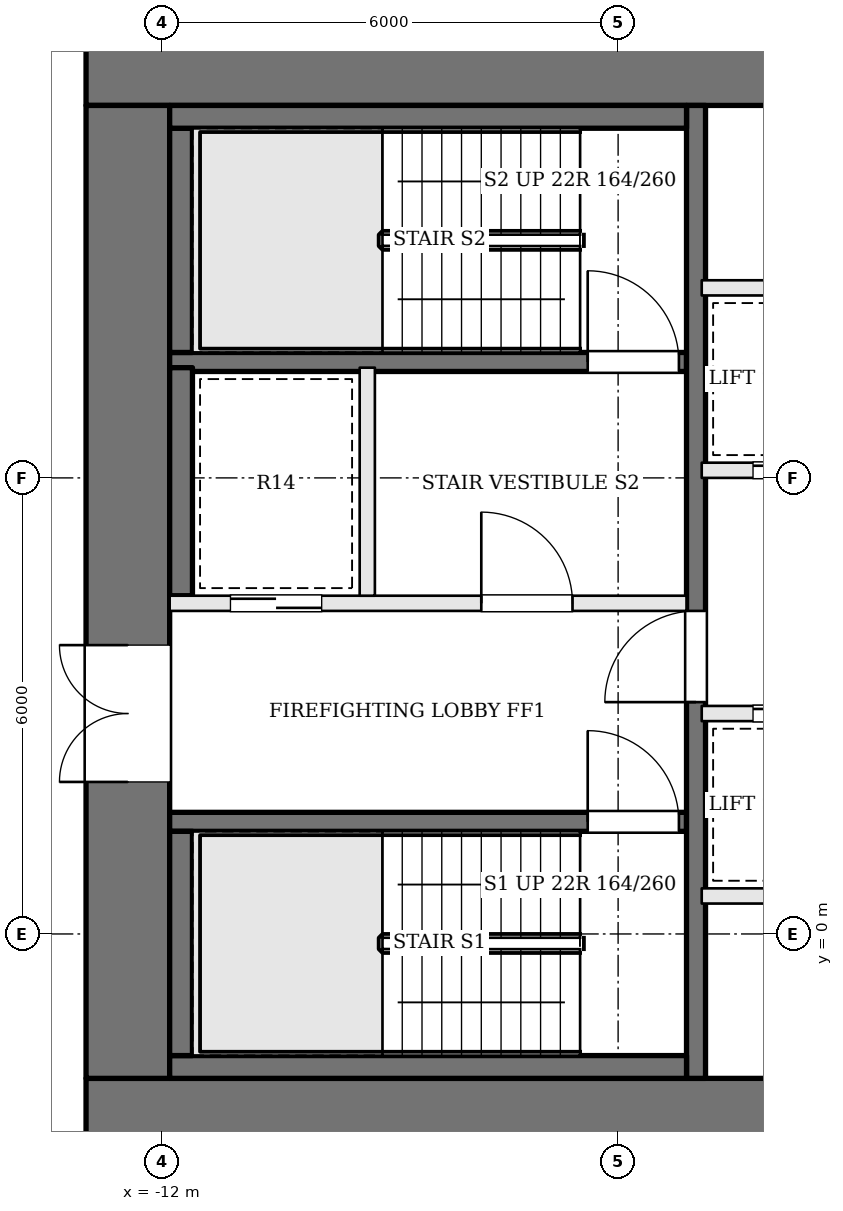
"""IFC4 building model, lengths in metres.
Left out: names, types, materials, properties, quantities, classifications, styles, units other than length and angle.
Written with IfcOpenShell. Run it as: python <this file> out.ifc"""

import sys

from ifc_helpers import new_model, si_unit, direction, frame, frame_2d, origin, place, context, subcontext, project, spatial, rectangle, extrude, element, fill, save


model = new_model("IFC4")
c1 = context("Model", 3, precision=1e-05, world=origin(), true_north=direction((0.0, 1.0)))
c2 = subcontext(c1, "Body", "Model", "MODEL_VIEW")
j1 = project(units=[si_unit("LENGTHUNIT", "METRE"), si_unit("PLANEANGLEUNIT", "RADIAN")], contexts=[c1])
p1 = place(None, origin())
s1 = spatial("IfcSite", under=j1, at=p1, CompositionType="ELEMENT")
p2 = place(p1, origin())
s2 = spatial("IfcBuilding", under=s1, at=p2, CompositionType="ELEMENT")
p3 = place(p2, frame((0.0, 0.0, 85.2)))
s3 = spatial("IfcBuildingStorey", under=s2, at=p3, CompositionType="ELEMENT", Elevation=85.2)
p4 = place(p3, frame((-13.0, 11.45, 0.0), z_axis=(0.0, 0.0, 1.0), x_axis=(1.0, 0.0, 0.0)))
e1 = element("IfcWall", 1, at=p4, inside=s3, PredefinedType="SHEAR", context=c2, shape_type="SweptSolid", body=[
    extrude(rectangle(XDim=26.0, YDim=1.1, at=frame_2d((13.0, 0.0))), origin(), (0.0, 0.0, 1.0), 3.6),
])
p5 = place(p4, frame((9.225, 0.0, 0.0)))
e2 = element("IfcOpeningElement", 2, at=p5, cuts=e1, PredefinedType="OPENING", context=c2, shape_type="SweptSolid", body=[
    extrude(rectangle(XDim=1.0, YDim=2.1, at=frame_2d((0.5, 1.05))), frame((0.0, 0.56, 0.0), z_axis=(0.0, -1.0, 0.0), x_axis=(1.0, 0.0, 0.0)), (0.0, 0.0, 1.0), 1.12),
])
p6 = place(p4, frame((12.225, 0.0, 0.0)))
e3 = element("IfcOpeningElement", 3, at=p6, cuts=e1, PredefinedType="OPENING", context=c2, shape_type="SweptSolid", body=[
    extrude(rectangle(XDim=0.7, YDim=2.1, at=frame_2d((0.35, 1.05))), frame((0.0, 0.56, 0.0), z_axis=(0.0, -1.0, 0.0), x_axis=(1.0, 0.0, 0.0)), (0.0, 0.0, 1.0), 1.12),
])
p7 = place(p4, frame((14.125, 0.0, 0.0)))
e4 = element("IfcOpeningElement", 4, at=p7, cuts=e1, PredefinedType="OPENING", context=c2, shape_type="SweptSolid", body=[
    extrude(rectangle(XDim=1.0, YDim=2.1, at=frame_2d((0.5, 1.05))), frame((0.0, 0.56, 0.0), z_axis=(0.0, -1.0, 0.0), x_axis=(1.0, 0.0, 0.0)), (0.0, 0.0, 1.0), 1.12),
])
p8 = place(p4, frame((15.65, 0.0, 0.0)))
e5 = element("IfcOpeningElement", 5, at=p8, cuts=e1, PredefinedType="OPENING", context=c2, shape_type="SweptSolid", body=[
    extrude(rectangle(XDim=1.0, YDim=2.1, at=frame_2d((0.5, 1.05))), frame((0.0, 0.56, 0.0), z_axis=(0.0, -1.0, 0.0), x_axis=(1.0, 0.0, 0.0)), (0.0, 0.0, 1.0), 1.12),
])
p9 = place(p3, frame((-13.0, -2.45, 0.0), z_axis=(0.0, 0.0, 1.0), x_axis=(1.0, 0.0, 0.0)))
e6 = element("IfcWall", 6, at=p9, inside=s3, PredefinedType="SHEAR", context=c2, shape_type="SweptSolid", body=[
    extrude(rectangle(XDim=26.0, YDim=1.1, at=frame_2d((13.0, 0.0))), origin(), (0.0, 0.0, 1.0), 3.6),
])
p10 = place(p9, frame((9.65, 0.0, 0.0)))
e7 = element("IfcOpeningElement", 7, at=p10, cuts=e6, PredefinedType="OPENING", context=c2, shape_type="SweptSolid", body=[
    extrude(rectangle(XDim=1.0, YDim=2.1, at=frame_2d((0.5, 1.05))), frame((0.0, 0.56, 0.0), z_axis=(0.0, -1.0, 0.0), x_axis=(1.0, 0.0, 0.0)), (0.0, 0.0, 1.0), 1.12),
])
p11 = place(p9, frame((12.925, 0.0, 0.0)))
e8 = element("IfcOpeningElement", 8, at=p11, cuts=e6, PredefinedType="OPENING", context=c2, shape_type="SweptSolid", body=[
    extrude(rectangle(XDim=1.0, YDim=2.1, at=frame_2d((0.5, 1.05))), frame((0.0, 0.56, 0.0), z_axis=(0.0, -1.0, 0.0), x_axis=(1.0, 0.0, 0.0)), (0.0, 0.0, 1.0), 1.12),
])
p12 = place(p9, frame((15.125, 0.0, 0.0)))
e9 = element("IfcOpeningElement", 9, at=p12, cuts=e6, PredefinedType="OPENING", context=c2, shape_type="SweptSolid", body=[
    extrude(rectangle(XDim=0.7, YDim=2.1, at=frame_2d((0.35, 1.05))), frame((0.0, 0.56, 0.0), z_axis=(0.0, -1.0, 0.0), x_axis=(1.0, 0.0, 0.0)), (0.0, 0.0, 1.0), 1.12),
])
p13 = place(p9, frame((16.5, 0.0, 0.0)))
e10 = element("IfcOpeningElement", 10, at=p13, cuts=e6, PredefinedType="OPENING", context=c2, shape_type="SweptSolid", body=[
    extrude(rectangle(XDim=1.0, YDim=2.1, at=frame_2d((0.5, 1.05))), frame((0.0, 0.56, 0.0), z_axis=(0.0, -1.0, 0.0), x_axis=(1.0, 0.0, 0.0)), (0.0, 0.0, 1.0), 1.12),
])
p14 = place(p3, frame((-12.45, -1.9, 0.0), z_axis=(0.0, 0.0, 1.0), x_axis=(0.0, 1.0, 0.0)))
e11 = element("IfcWall", 11, at=p14, inside=s3, PredefinedType="SHEAR", context=c2, shape_type="SweptSolid", body=[
    extrude(rectangle(XDim=12.8, YDim=1.1, at=frame_2d((6.4, 0.0))), origin(), (0.0, 0.0, 1.0), 3.6),
])
p15 = place(p14, frame((3.9, 0.0, 0.0)))
e12 = element("IfcOpeningElement", 12, at=p15, cuts=e11, PredefinedType="OPENING", context=c2, shape_type="SweptSolid", body=[
    extrude(rectangle(XDim=1.8, YDim=2.1, at=frame_2d((0.9, 1.05))), frame((0.0, 0.56, 0.0), z_axis=(0.0, -1.0, 0.0), x_axis=(1.0, 0.0, 0.0)), (0.0, 0.0, 1.0), 1.12),
])
p16 = place(p3, frame((-11.9, 1.475, 0.0), z_axis=(0.0, 0.0, 1.0), x_axis=(1.0, 0.0, 0.0)))
e13 = element("IfcWall", 13, at=p16, inside=s3, PredefinedType="SOLIDWALL", context=c2, shape_type="SweptSolid", body=[
    extrude(rectangle(XDim=6.8, YDim=0.25, at=frame_2d((3.4, 0.0))), origin(), (0.0, 0.0, 1.0), 3.4),
])
p17 = place(p16, frame((5.5, 0.0, 0.0)))
e14 = element("IfcOpeningElement", 14, at=p17, cuts=e13, PredefinedType="OPENING", context=c2, shape_type="SweptSolid", body=[
    extrude(rectangle(XDim=1.2, YDim=2.1, at=frame_2d((0.6, 1.05))), frame((0.0, 0.135, 0.0), z_axis=(0.0, -1.0, 0.0), x_axis=(1.0, 0.0, 0.0)), (0.0, 0.0, 1.0), 0.27),
])
p18 = place(p3, frame((-11.9, 4.35, 0.0), z_axis=(0.0, 0.0, 1.0), x_axis=(1.0, 0.0, 0.0)))
e15 = element("IfcWall", 15, at=p18, inside=s3, PredefinedType="SOLIDWALL", context=c2, shape_type="SweptSolid", body=[
    extrude(rectangle(XDim=6.8, YDim=0.2, at=frame_2d((3.4, 0.0))), origin(), (0.0, 0.0, 1.0), 3.4),
])
p19 = place(p18, frame((4.1, 0.0, 0.0)))
e16 = element("IfcOpeningElement", 16, at=p19, cuts=e15, PredefinedType="OPENING", context=c2, shape_type="SweptSolid", body=[
    extrude(rectangle(XDim=1.2, YDim=2.1, at=frame_2d((0.6, 1.05))), frame((0.0, 0.11, 0.0), z_axis=(0.0, -1.0, 0.0), x_axis=(1.0, 0.0, 0.0)), (0.0, 0.0, 1.0), 0.22),
])
p20 = place(p18, frame((0.8, 0.0, 0.0)))
e17 = element("IfcOpeningElement", 17, at=p20, cuts=e15, PredefinedType="OPENING", context=c2, shape_type="SweptSolid", body=[
    extrude(rectangle(XDim=1.2, YDim=2.1, at=frame_2d((0.6, 1.05))), frame((0.0, 0.11, 0.0), z_axis=(0.0, -1.0, 0.0), x_axis=(1.0, 0.0, 0.0)), (0.0, 0.0, 1.0), 0.22),
])
p21 = place(p3, frame((-11.9, 7.525, 0.0), z_axis=(0.0, 0.0, 1.0), x_axis=(1.0, 0.0, 0.0)))
e18 = element("IfcWall", 18, at=p21, inside=s3, PredefinedType="SOLIDWALL", context=c2, shape_type="SweptSolid", body=[
    extrude(rectangle(XDim=6.8, YDim=0.25, at=frame_2d((3.4, 0.0))), origin(), (0.0, 0.0, 1.0), 3.4),
])
p22 = place(p21, frame((5.5, 0.0, 0.0)))
e19 = element("IfcOpeningElement", 19, at=p22, cuts=e18, PredefinedType="OPENING", context=c2, shape_type="SweptSolid", body=[
    extrude(rectangle(XDim=1.2, YDim=2.1, at=frame_2d((0.6, 1.05))), frame((0.0, 0.135, 0.0), z_axis=(0.0, -1.0, 0.0), x_axis=(1.0, 0.0, 0.0)), (0.0, 0.0, 1.0), 0.27),
])
p23 = place(p3, frame((-9.3, 4.45, 0.0), z_axis=(0.0, 0.0, 1.0), x_axis=(0.0, 1.0, 0.0)))
e20 = element("IfcWall", 20, at=p23, inside=s3, PredefinedType="SOLIDWALL", context=c2, shape_type="SweptSolid", body=[
    extrude(rectangle(XDim=3.0, YDim=0.2, at=frame_2d((1.5, 0.0))), origin(), (0.0, 0.0, 1.0), 3.4),
])
p24 = place(p3, frame((-4.975, -1.9, 0.0), z_axis=(0.0, 0.0, 1.0), x_axis=(0.0, 1.0, 0.0)))
e21 = element("IfcWall", 21, at=p24, inside=s3, PredefinedType="SOLIDWALL", context=c2, shape_type="SweptSolid", body=[
    extrude(rectangle(XDim=12.8, YDim=0.25, at=frame_2d((6.4, 0.0))), origin(), (0.0, 0.0, 1.0), 3.4),
])
p25 = place(p24, frame((4.95, 0.0, 0.0)))
e22 = element("IfcOpeningElement", 22, at=p25, cuts=e21, PredefinedType="OPENING", context=c2, shape_type="SweptSolid", body=[
    extrude(rectangle(XDim=1.2, YDim=2.1, at=frame_2d((0.6, 1.05))), frame((0.0, 0.135, 0.0), z_axis=(0.0, -1.0, 0.0), x_axis=(1.0, 0.0, 0.0)), (0.0, 0.0, 1.0), 0.27),
])
p26 = place(p3, frame((-11.9, -1.75, 0.0), z_axis=(0.0, 0.0, 1.0), x_axis=(1.0, 0.0, 0.0)))
e23 = element("IfcWall", 23, at=p26, inside=s3, PredefinedType="SOLIDWALL", context=c2, shape_type="SweptSolid", body=[
    extrude(rectangle(XDim=6.8, YDim=0.3, at=frame_2d((3.4, 0.0))), origin(), (0.0, 0.0, 1.0), 3.4),
])
p27 = place(p3, frame((-11.75, -1.6, 0.0), z_axis=(0.0, 0.0, 1.0), x_axis=(0.0, 1.0, 0.0)))
e24 = element("IfcWall", 24, at=p27, inside=s3, PredefinedType="SOLIDWALL", context=c2, shape_type="SweptSolid", body=[
    extrude(rectangle(XDim=2.95, YDim=0.3, at=frame_2d((1.475, 0.0))), origin(), (0.0, 0.0, 1.0), 3.4),
])
p28 = place(p3, frame((-11.75, 4.45, 0.0), z_axis=(0.0, 0.0, 1.0), x_axis=(0.0, 1.0, 0.0)))
e25 = element("IfcWall", 25, at=p28, inside=s3, PredefinedType="SOLIDWALL", context=c2, shape_type="SweptSolid", body=[
    extrude(rectangle(XDim=3.0, YDim=0.3, at=frame_2d((1.5, 0.0))), origin(), (0.0, 0.0, 1.0), 3.4),
])
p29 = place(p3, frame((-11.75, 7.65, 0.0), z_axis=(0.0, 0.0, 1.0), x_axis=(0.0, 1.0, 0.0)))
e26 = element("IfcWall", 26, at=p29, inside=s3, PredefinedType="SOLIDWALL", context=c2, shape_type="SweptSolid", body=[
    extrude(rectangle(XDim=2.95, YDim=0.3, at=frame_2d((1.475, 0.0))), origin(), (0.0, 0.0, 1.0), 3.4),
])
p30 = place(p3, frame((-11.9, 10.75, 0.0), z_axis=(0.0, 0.0, 1.0), x_axis=(1.0, 0.0, 0.0)))
e27 = element("IfcWall", 27, at=p30, inside=s3, PredefinedType="SOLIDWALL", context=c2, shape_type="SweptSolid", body=[
    extrude(rectangle(XDim=6.8, YDim=0.3, at=frame_2d((3.4, 0.0))), origin(), (0.0, 0.0, 1.0), 3.4),
])
p31 = place(p3, frame((-4.9, 0.5, 0.0), z_axis=(0.0, 0.0, 1.0), x_axis=(1.0, 0.0, 0.0)))
e28 = element("IfcWall", 28, at=p31, inside=s3, PredefinedType="SOLIDWALL", context=c2, shape_type="SweptSolid", body=[
    extrude(rectangle(XDim=9.8, YDim=0.2, at=frame_2d((4.9, 0.0))), origin(), (0.0, 0.0, 1.0), 3.4),
])
p32 = place(p3, frame((-4.9, 2.9, 0.0), z_axis=(0.0, 0.0, 1.0), x_axis=(1.0, 0.0, 0.0)))
e29 = element("IfcWall", 29, at=p32, inside=s3, PredefinedType="SOLIDWALL", context=c2, shape_type="SweptSolid", body=[
    extrude(rectangle(XDim=9.8, YDim=0.2, at=frame_2d((4.9, 0.0))), origin(), (0.0, 0.0, 1.0), 3.4),
])
p33 = place(p32, frame((0.675, 0.0, 0.0)))
e30 = element("IfcOpeningElement", 30, at=p33, cuts=e29, PredefinedType="OPENING", context=c2, shape_type="SweptSolid", body=[
    extrude(rectangle(XDim=1.1, YDim=2.1, at=frame_2d((0.55, 1.05))), frame((0.0, 0.11, 0.0), z_axis=(0.0, -1.0, 0.0), x_axis=(1.0, 0.0, 0.0)), (0.0, 0.0, 1.0), 0.22),
])
p34 = place(p32, frame((3.125, 0.0, 0.0)))
e31 = element("IfcOpeningElement", 31, at=p34, cuts=e29, PredefinedType="OPENING", context=c2, shape_type="SweptSolid", body=[
    extrude(rectangle(XDim=1.1, YDim=2.1, at=frame_2d((0.55, 1.05))), frame((0.0, 0.11, 0.0), z_axis=(0.0, -1.0, 0.0), x_axis=(1.0, 0.0, 0.0)), (0.0, 0.0, 1.0), 0.22),
])
p35 = place(p3, frame((-4.9, 6.1, 0.0), z_axis=(0.0, 0.0, 1.0), x_axis=(1.0, 0.0, 0.0)))
e32 = element("IfcWall", 32, at=p35, inside=s3, PredefinedType="SOLIDWALL", context=c2, shape_type="SweptSolid", body=[
    extrude(rectangle(XDim=9.8, YDim=0.2, at=frame_2d((4.9, 0.0))), origin(), (0.0, 0.0, 1.0), 3.4),
])
p36 = place(p35, frame((0.675, 0.0, 0.0)))
e33 = element("IfcOpeningElement", 33, at=p36, cuts=e32, PredefinedType="OPENING", context=c2, shape_type="SweptSolid", body=[
    extrude(rectangle(XDim=1.1, YDim=2.1, at=frame_2d((0.55, 1.05))), frame((0.0, 0.11, 0.0), z_axis=(0.0, -1.0, 0.0), x_axis=(1.0, 0.0, 0.0)), (0.0, 0.0, 1.0), 0.22),
])
p37 = place(p35, frame((3.125, 0.0, 0.0)))
e34 = element("IfcOpeningElement", 34, at=p37, cuts=e32, PredefinedType="OPENING", context=c2, shape_type="SweptSolid", body=[
    extrude(rectangle(XDim=1.1, YDim=2.1, at=frame_2d((0.55, 1.05))), frame((0.0, 0.11, 0.0), z_axis=(0.0, -1.0, 0.0), x_axis=(1.0, 0.0, 0.0)), (0.0, 0.0, 1.0), 0.22),
])
p38 = place(p35, frame((5.575, 0.0, 0.0)))
e35 = element("IfcOpeningElement", 35, at=p38, cuts=e32, PredefinedType="OPENING", context=c2, shape_type="SweptSolid", body=[
    extrude(rectangle(XDim=1.1, YDim=2.1, at=frame_2d((0.55, 1.05))), frame((0.0, 0.11, 0.0), z_axis=(0.0, -1.0, 0.0), x_axis=(1.0, 0.0, 0.0)), (0.0, 0.0, 1.0), 0.22),
])
p39 = place(p35, frame((8.025, 0.0, 0.0)))
e36 = element("IfcOpeningElement", 36, at=p39, cuts=e32, PredefinedType="OPENING", context=c2, shape_type="SweptSolid", body=[
    extrude(rectangle(XDim=1.1, YDim=2.1, at=frame_2d((0.55, 1.05))), frame((0.0, 0.11, 0.0), z_axis=(0.0, -1.0, 0.0), x_axis=(1.0, 0.0, 0.0)), (0.0, 0.0, 1.0), 0.22),
])
p40 = place(p3, frame((-4.9, 8.5, 0.0), z_axis=(0.0, 0.0, 1.0), x_axis=(1.0, 0.0, 0.0)))
e37 = element("IfcWall", 37, at=p40, inside=s3, PredefinedType="SOLIDWALL", context=c2, shape_type="SweptSolid", body=[
    extrude(rectangle(XDim=9.8, YDim=0.2, at=frame_2d((4.9, 0.0))), origin(), (0.0, 0.0, 1.0), 3.4),
])
p41 = place(p15, origin())
e38 = element("IfcDoor", 38, at=p41, inside=s3, OperationType="DOUBLE_DOOR_SINGLE_SWING", PredefinedType="DOOR", context=c2, shape_type="SweptSolid", body=[
    extrude(rectangle(XDim=1.8, YDim=2.1, at=frame_2d((0.9, 1.05))), frame((0.0, 0.025, 0.0), z_axis=(0.0, -1.0, 0.0), x_axis=(1.0, 0.0, 0.0)), (0.0, 0.0, 1.0), 0.05),
])
fill(e12, e38)
p42 = place(p25, origin())
e39 = element("IfcDoor", 39, at=p42, inside=s3, OperationType="SINGLE_SWING_LEFT", PredefinedType="DOOR", context=c2, shape_type="SweptSolid", body=[
    extrude(rectangle(XDim=1.2, YDim=2.1, at=frame_2d((0.6, 1.05))), frame((0.0, 0.025, 0.0), z_axis=(0.0, -1.0, 0.0), x_axis=(1.0, 0.0, 0.0)), (0.0, 0.0, 1.0), 0.05),
])
fill(e22, e39)
p43 = place(p19, origin())
e40 = element("IfcDoor", 40, at=p43, inside=s3, OperationType="SINGLE_SWING_LEFT", PredefinedType="DOOR", context=c2, shape_type="SweptSolid", body=[
    extrude(rectangle(XDim=1.2, YDim=2.1, at=frame_2d((0.6, 1.05))), frame((0.0, 0.025, 0.0), z_axis=(0.0, -1.0, 0.0), x_axis=(1.0, 0.0, 0.0)), (0.0, 0.0, 1.0), 0.05),
])
fill(e16, e40)
p44 = place(p17, origin())
e41 = element("IfcDoor", 41, at=p44, inside=s3, OperationType="SINGLE_SWING_LEFT", PredefinedType="DOOR", context=c2, shape_type="SweptSolid", body=[
    extrude(rectangle(XDim=1.2, YDim=2.1, at=frame_2d((0.6, 1.05))), frame((0.0, 0.025, 0.0), z_axis=(0.0, -1.0, 0.0), x_axis=(1.0, 0.0, 0.0)), (0.0, 0.0, 1.0), 0.05),
])
fill(e14, e41)
p45 = place(p22, origin())
e42 = element("IfcDoor", 42, at=p45, inside=s3, OperationType="SINGLE_SWING_LEFT", PredefinedType="DOOR", context=c2, shape_type="SweptSolid", body=[
    extrude(rectangle(XDim=1.2, YDim=2.1, at=frame_2d((0.6, 1.05))), frame((0.0, 0.025, 0.0), z_axis=(0.0, -1.0, 0.0), x_axis=(1.0, 0.0, 0.0)), (0.0, 0.0, 1.0), 0.05),
])
fill(e19, e42)
p46 = place(p20, origin())
e43 = element("IfcDoor", 43, at=p46, inside=s3, OperationType="SLIDING_TO_RIGHT", PredefinedType="DOOR", context=c2, shape_type="SweptSolid", body=[
    extrude(rectangle(XDim=1.2, YDim=2.1, at=frame_2d((0.6, 1.05))), frame((0.0, 0.025, 0.0), z_axis=(0.0, -1.0, 0.0), x_axis=(1.0, 0.0, 0.0)), (0.0, 0.0, 1.0), 0.05),
])
fill(e17, e43)
p47 = place(p33, origin())
e44 = element("IfcDoor", 44, at=p47, inside=s3, OperationType="SLIDING_TO_RIGHT", PredefinedType="DOOR", context=c2, shape_type="SweptSolid", body=[
    extrude(rectangle(XDim=1.1, YDim=2.1, at=frame_2d((0.55, 1.05))), frame((0.0, 0.025, 0.0), z_axis=(0.0, -1.0, 0.0), x_axis=(1.0, 0.0, 0.0)), (0.0, 0.0, 1.0), 0.05),
])
fill(e30, e44)
p48 = place(p36, origin())
e45 = element("IfcDoor", 45, at=p48, inside=s3, OperationType="SLIDING_TO_RIGHT", PredefinedType="DOOR", context=c2, shape_type="SweptSolid", body=[
    extrude(rectangle(XDim=1.1, YDim=2.1, at=frame_2d((0.55, 1.05))), frame((0.0, 0.025, 0.0), z_axis=(0.0, -1.0, 0.0), x_axis=(1.0, 0.0, 0.0)), (0.0, 0.0, 1.0), 0.05),
])
fill(e33, e45)
save(model, sys.argv[1])
